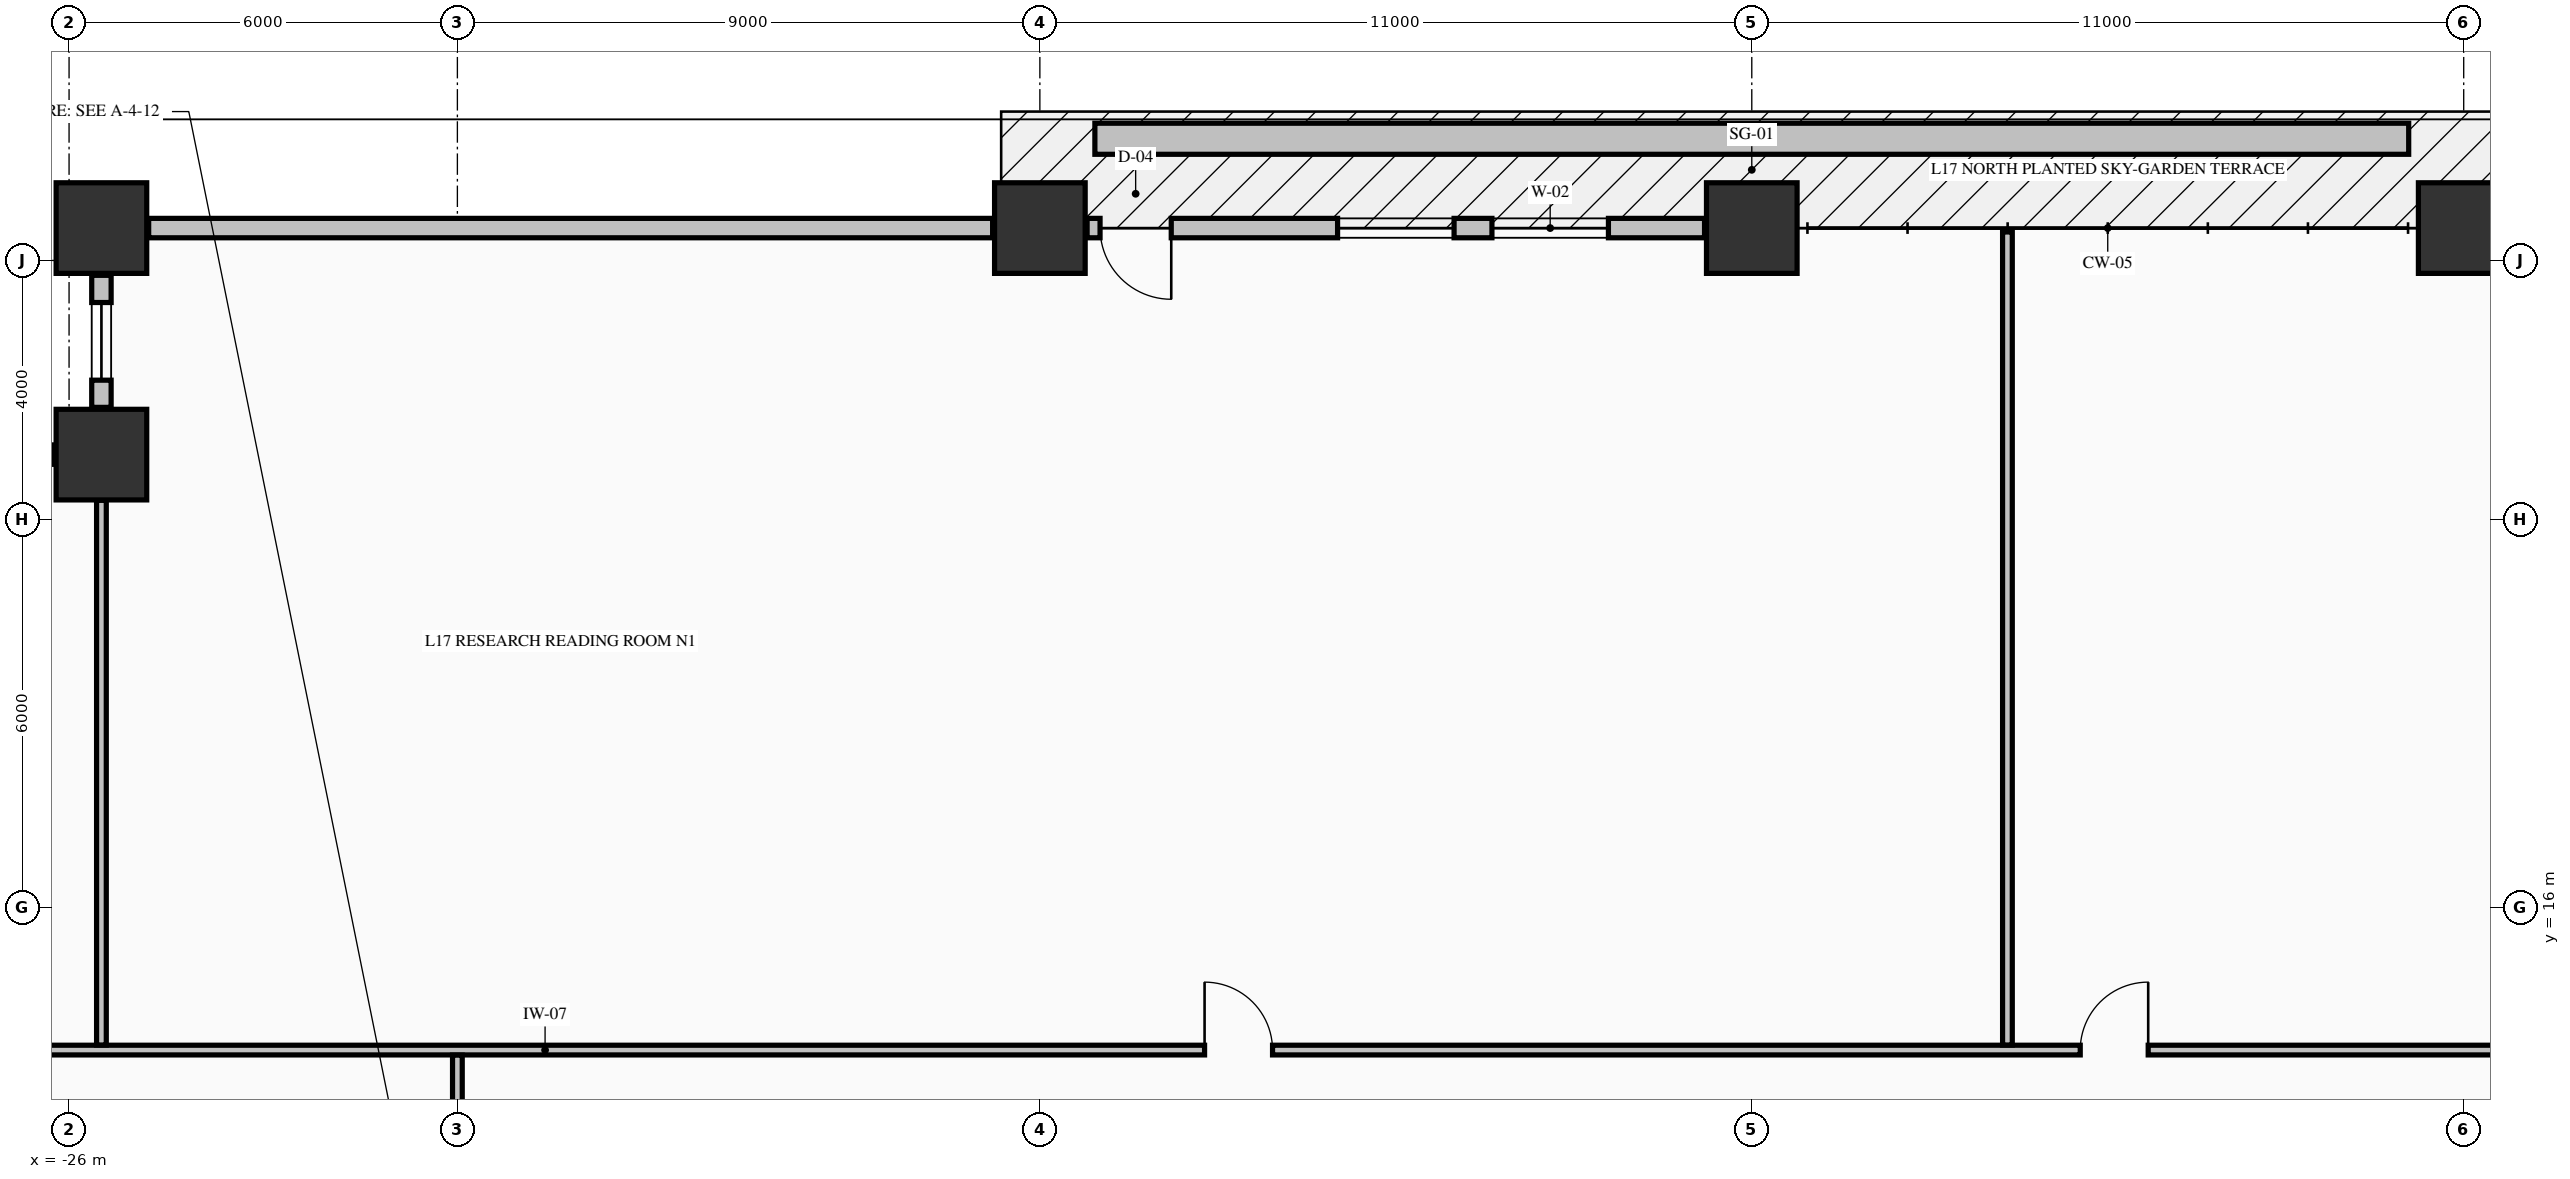
"""IFC4 building model, lengths in metres.
Left out: names, types, materials, properties, quantities, classifications, styles, units other than length and angle.
Written with IfcOpenShell. Run it as: python <this file> out.ifc"""

import sys

from ifc_helpers import new_model, si_unit, direction, frame, frame_2d, origin, origin_2d, place, context, subcontext, project, spatial, rectangle, extrude, element, fill, save


model = new_model("IFC4")
c1 = context("Model", 3, precision=1e-05, world=origin(), true_north=direction((0.0, 1.0)))
c2 = subcontext(c1, "Body", "Model", "MODEL_VIEW")
j1 = project(units=[si_unit("LENGTHUNIT", "METRE"), si_unit("PLANEANGLEUNIT", "RADIAN")], contexts=[c1])
p1 = place(None, origin())
s1 = spatial("IfcSite", under=j1, at=p1, CompositionType="ELEMENT")
p2 = place(p1, origin())
s2 = spatial("IfcBuilding", under=s1, at=p2, CompositionType="ELEMENT")
p3 = place(p2, frame((0.0, 0.0, 71.47)))
s3 = spatial("IfcBuildingStorey", under=s2, at=p3, CompositionType="ELEMENT", Elevation=71.47)
for number, where, z_axis, x_axis in (
    (1, (-25.5, 26.5, -0.325), (0.0, 0.0, 1.0), (1.0, 0.0, 0.0)),
    (2, (-11.0, 26.5, -0.325), (0.0, 0.0, 1.0), (1.0, 0.0, 0.0)),
    (3, (0.0, 26.5, -0.325), (0.0, 0.0, 1.0), (1.0, 0.0, 0.0)),
    (4, (11.0, 26.5, -0.325), (0.0, 0.0, 1.0), (1.0, 0.0, 0.0)),
    (5, (-25.5, 23.0, -0.325), (0.0, 0.0, 1.0), (1.0, 0.0, 0.0)),
):
    element("IfcColumn", number, at=place(p3, frame(where, z_axis=z_axis, x_axis=x_axis)), inside=s3, PredefinedType="COLUMN", context=c2, shape_type="SweptSolid", body=[
        extrude(rectangle(XDim=1.4, YDim=1.4, at=origin_2d()), origin(), (0.0, 0.0, 1.0), 3.645),
    ])
p4 = place(p3, frame((-25.5, 25.77, 0.0), z_axis=(0.0, 0.0, 1.0), x_axis=(0.0, -1.0, 0.0)))
e6 = element("IfcWall", 6, at=p4, inside=s3, PredefinedType="STANDARD", context=c2, shape_type="SweptSolid", body=[
    extrude(rectangle(XDim=2.04, YDim=0.3, at=frame_2d((1.02, 0.0))), origin(), (0.0, 0.0, 1.0), 2.712),
])
p5 = place(p4, frame((0.42, 0.0, 0.82)))
e7 = element("IfcOpeningElement", 7, at=p5, cuts=e6, PredefinedType="OPENING", context=c2, shape_type="SweptSolid", body=[
    extrude(rectangle(XDim=1.2, YDim=1.65, at=frame_2d((0.6, 0.825))), frame((0.0, 0.16, 0.0), z_axis=(0.0, -1.0, 0.0), x_axis=(1.0, 0.0, 0.0)), (0.0, 0.0, 1.0), 0.32),
])
p6 = place(p3, frame((-26.23, 23.0, 0.0), z_axis=(0.0, 0.0, 1.0), x_axis=(-1.0, 0.0, 0.0)))
e8 = element("IfcWall", 8, at=p6, inside=s3, PredefinedType="STANDARD", context=c2, shape_type="SweptSolid", body=[
    extrude(rectangle(XDim=2.04, YDim=0.3, at=frame_2d((1.02, 0.0))), origin(), (0.0, 0.0, 1.0), 2.712),
])
p7 = place(p6, frame((0.42, 0.0, 0.82)))
e9 = element("IfcOpeningElement", 9, at=p7, cuts=e8, PredefinedType="OPENING", context=c2, shape_type="SweptSolid", body=[
    extrude(rectangle(XDim=1.2, YDim=1.65, at=frame_2d((0.6, 0.825))), frame((0.0, 0.16, 0.0), z_axis=(0.0, -1.0, 0.0), x_axis=(1.0, 0.0, 0.0)), (0.0, 0.0, 1.0), 0.32),
])
p8 = place(p3, frame((-11.73, 26.5, 0.0), z_axis=(0.0, 0.0, 1.0), x_axis=(-1.0, 0.0, 0.0)))
e10 = element("IfcWall", 10, at=p8, inside=s3, PredefinedType="STANDARD", context=c2, shape_type="SweptSolid", body=[
    extrude(rectangle(XDim=13.04, YDim=0.3, at=frame_2d((6.52, 0.0))), origin(), (0.0, 0.0, 1.0), 2.712),
])
p9 = place(p3, frame((-0.73, 26.5, 0.0), z_axis=(0.0, 0.0, 1.0), x_axis=(-1.0, 0.0, 0.0)))
e11 = element("IfcWall", 11, at=p9, inside=s3, PredefinedType="STANDARD", context=c2, shape_type="SweptSolid", body=[
    extrude(rectangle(XDim=9.54, YDim=0.3, at=frame_2d((4.77, 0.0))), origin(), (0.0, 0.0, 1.0), 2.712),
])
p10 = place(p9, frame((8.24, 0.0, 0.0)))
e12 = element("IfcOpeningElement", 12, at=p10, cuts=e11, PredefinedType="OPENING", context=c2, shape_type="SweptSolid", body=[
    extrude(rectangle(XDim=1.1, YDim=2.15, at=frame_2d((0.55, 1.075))), frame((0.0, 0.16, 0.0), z_axis=(0.0, -1.0, 0.0), x_axis=(1.0, 0.0, 0.0)), (0.0, 0.0, 1.0), 0.32),
])
p11 = place(p9, frame((1.485, 0.0, 0.78)))
e13 = element("IfcOpeningElement", 13, at=p11, cuts=e11, PredefinedType="OPENING", context=c2, shape_type="SweptSolid", body=[
    extrude(rectangle(XDim=1.8, YDim=1.72, at=frame_2d((0.9, 0.86))), frame((0.0, 0.16, 0.0), z_axis=(0.0, -1.0, 0.0), x_axis=(1.0, 0.0, 0.0)), (0.0, 0.0, 1.0), 0.32),
])
p12 = place(p9, frame((3.87, 0.0, 0.78)))
e14 = element("IfcOpeningElement", 14, at=p12, cuts=e11, PredefinedType="OPENING", context=c2, shape_type="SweptSolid", body=[
    extrude(rectangle(XDim=1.8, YDim=1.72, at=frame_2d((0.9, 0.86))), frame((0.0, 0.16, 0.0), z_axis=(0.0, -1.0, 0.0), x_axis=(1.0, 0.0, 0.0)), (0.0, 0.0, 1.0), 0.32),
])
p13 = place(p3, frame((-28.835, 13.8, 0.0), z_axis=(0.0, 0.0, 1.0), x_axis=(1.0, 0.0, 0.0)))
e15 = element("IfcWall", 15, at=p13, inside=s3, PredefinedType="PARTITIONING", context=c2, shape_type="SweptSolid", body=[
    extrude(rectangle(XDim=52.67, YDim=0.15, at=frame_2d((26.335, 0.0))), origin(), (0.0, 0.0, 1.0), 3.32),
])
p14 = place(p13, frame((20.38, 0.0, 0.0)))
e16 = element("IfcOpeningElement", 16, at=p14, cuts=e15, PredefinedType="OPENING", context=c2, shape_type="SweptSolid", body=[
    extrude(rectangle(XDim=1.05, YDim=2.15, at=frame_2d((0.525, 1.075))), frame((0.0, 0.085, 0.0), z_axis=(0.0, -1.0, 0.0), x_axis=(1.0, 0.0, 0.0)), (0.0, 0.0, 1.0), 0.17),
])
p15 = place(p13, frame((33.91, 0.0, 0.0)))
e17 = element("IfcOpeningElement", 17, at=p15, cuts=e15, PredefinedType="OPENING", context=c2, shape_type="SweptSolid", body=[
    extrude(rectangle(XDim=1.05, YDim=2.15, at=frame_2d((0.525, 1.075))), frame((0.0, 0.085, 0.0), z_axis=(0.0, -1.0, 0.0), x_axis=(1.0, 0.0, 0.0)), (0.0, 0.0, 1.0), 0.17),
])
p16 = place(p3, frame((-25.5, 13.878, 0.0), z_axis=(0.0, 0.0, 1.0), x_axis=(0.0, 1.0, 0.0)))
e18 = element("IfcWall", 18, at=p16, inside=s3, PredefinedType="PARTITIONING", context=c2, shape_type="SweptSolid", body=[
    extrude(rectangle(XDim=8.416, YDim=0.15, at=frame_2d((4.208, 0.0))), origin(), (0.0, 0.0, 1.0), 3.32),
])
p17 = place(p3, frame((-20.0, 11.106, 0.0), z_axis=(0.0, 0.0, 1.0), x_axis=(0.0, 1.0, 0.0)))
e19 = element("IfcWall", 19, at=p17, inside=s3, PredefinedType="PARTITIONING", context=c2, shape_type="SweptSolid", body=[
    extrude(rectangle(XDim=2.616, YDim=0.15, at=frame_2d((1.308, 0.0))), origin(), (0.0, 0.0, 1.0), 2.66),
])
p18 = place(p17, frame((0.569, 0.0, 0.0)))
e20 = element("IfcOpeningElement", 20, at=p18, cuts=e19, PredefinedType="OPENING", context=c2, shape_type="SweptSolid", body=[
    extrude(rectangle(XDim=0.95, YDim=2.15, at=frame_2d((0.475, 1.075))), frame((0.0, 0.085, 0.0), z_axis=(0.0, -1.0, 0.0), x_axis=(1.0, 0.0, 0.0)), (0.0, 0.0, 1.0), 0.17),
])
p19 = place(p3, frame((3.95, 13.878, 0.0), z_axis=(0.0, 0.0, 1.0), x_axis=(0.0, 1.0, 0.0)))
e21 = element("IfcWall", 21, at=p19, inside=s3, PredefinedType="PARTITIONING", context=c2, shape_type="SweptSolid", body=[
    extrude(rectangle(XDim=12.562, YDim=0.15, at=frame_2d((6.281, 0.0))), origin(), (0.0, 0.0, 1.0), 3.32),
])
p20 = place(p3, frame((-10.15, 27.88, -0.04), z_axis=(0.0, 0.0, 1.0), x_axis=(1.0, 0.0, 0.0)))
e22 = element("IfcWall", 22, at=p20, inside=s3, PredefinedType="PARAPET", context=c2, shape_type="SweptSolid", body=[
    extrude(rectangle(XDim=20.3, YDim=0.48, at=frame_2d((10.15, 0.0))), origin(), (0.0, 0.0, 1.0), 0.52),
])
p21 = place(p5, origin())
e23 = element("IfcWindow", 23, at=p21, inside=s3, PartitioningType="SINGLE_PANEL", PredefinedType="WINDOW", context=c2, shape_type="SweptSolid", body=[
    extrude(rectangle(XDim=1.2, YDim=1.65, at=frame_2d((0.6, 0.825))), frame((0.0, 0.03, 0.0), z_axis=(0.0, -1.0, 0.0), x_axis=(1.0, 0.0, 0.0)), (0.0, 0.0, 1.0), 0.06),
])
fill(e7, e23)
p22 = place(p10, origin())
e24 = element("IfcDoor", 24, at=p22, inside=s3, OperationType="SINGLE_SWING_LEFT", PredefinedType="DOOR", context=c2, shape_type="SweptSolid", body=[
    extrude(rectangle(XDim=1.1, YDim=2.15, at=frame_2d((0.55, 1.075))), frame((0.0, 0.025, 0.0), z_axis=(0.0, -1.0, 0.0), x_axis=(1.0, 0.0, 0.0)), (0.0, 0.0, 1.0), 0.05),
])
fill(e12, e24)
p23 = place(p11, origin())
e25 = element("IfcWindow", 25, at=p23, inside=s3, PartitioningType="SINGLE_PANEL", PredefinedType="WINDOW", context=c2, shape_type="SweptSolid", body=[
    extrude(rectangle(XDim=1.8, YDim=1.72, at=frame_2d((0.9, 0.86))), frame((0.0, 0.03, 0.0), z_axis=(0.0, -1.0, 0.0), x_axis=(1.0, 0.0, 0.0)), (0.0, 0.0, 1.0), 0.06),
])
fill(e13, e25)
p24 = place(p12, origin())
e26 = element("IfcWindow", 26, at=p24, inside=s3, PartitioningType="SINGLE_PANEL", PredefinedType="WINDOW", context=c2, shape_type="SweptSolid", body=[
    extrude(rectangle(XDim=1.8, YDim=1.72, at=frame_2d((0.9, 0.86))), frame((0.0, 0.03, 0.0), z_axis=(0.0, -1.0, 0.0), x_axis=(1.0, 0.0, 0.0)), (0.0, 0.0, 1.0), 0.06),
])
fill(e14, e26)
p25 = place(p14, origin())
e27 = element("IfcDoor", 27, at=p25, inside=s3, OperationType="SINGLE_SWING_LEFT", PredefinedType="DOOR", context=c2, shape_type="SweptSolid", body=[
    extrude(rectangle(XDim=1.05, YDim=2.15, at=frame_2d((0.525, 1.075))), frame((0.0, 0.025, 0.0), z_axis=(0.0, -1.0, 0.0), x_axis=(1.0, 0.0, 0.0)), (0.0, 0.0, 1.0), 0.05),
])
fill(e16, e27)
p26 = place(p15, origin())
e28 = element("IfcDoor", 28, at=p26, inside=s3, OperationType="SINGLE_SWING_RIGHT", PredefinedType="DOOR", context=c2, shape_type="SweptSolid", body=[
    extrude(rectangle(XDim=1.05, YDim=2.15, at=frame_2d((0.525, 1.075))), frame((0.0, 0.025, 0.0), z_axis=(0.0, -1.0, 0.0), x_axis=(1.0, 0.0, 0.0)), (0.0, 0.0, 1.0), 0.05),
])
fill(e17, e28)
save(model, sys.argv[1])
